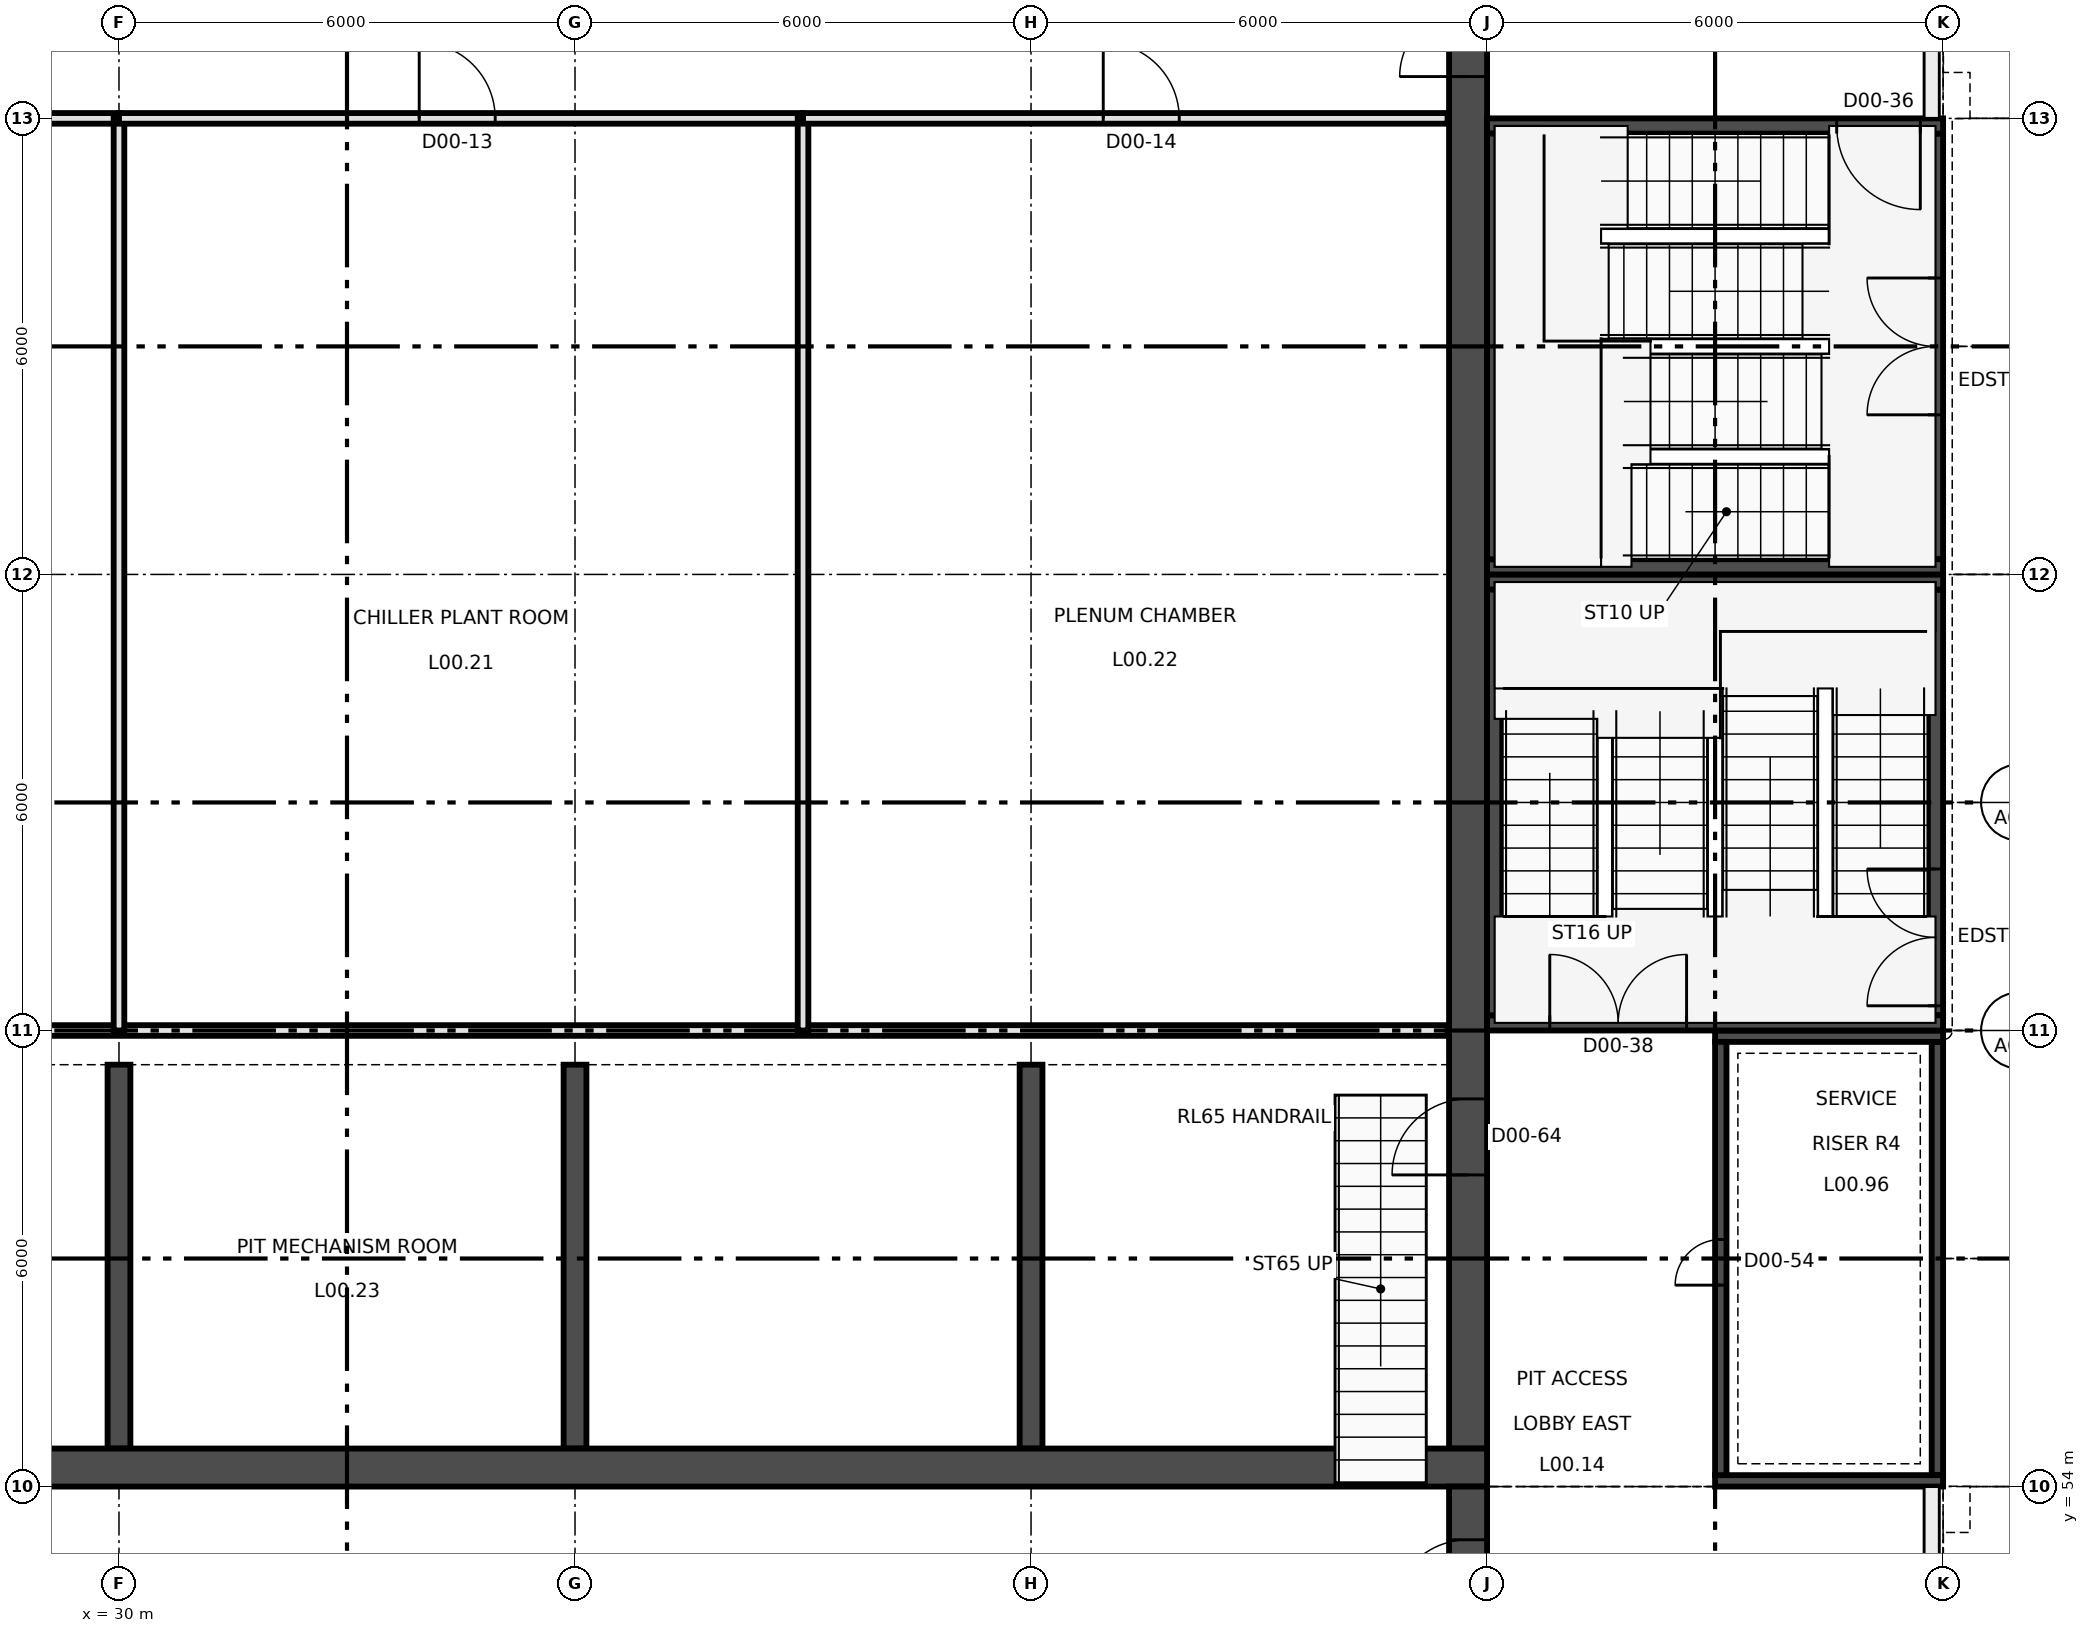
"""IFC4 building model, lengths in metres.
Left out: names, types, materials, properties, quantities, classifications, styles, units other than length and angle.
Written with IfcOpenShell. Run it as: python <this file> out.ifc"""

import sys

from ifc_helpers import new_model, si_unit, direction, frame, frame_2d, origin, place, context, subcontext, project, spatial, rectangle, extrude, element, fill, save


model = new_model("IFC4")
c1 = context("Model", 3, precision=1e-05, world=origin(), true_north=direction((0.0, 1.0)))
c2 = subcontext(c1, "Body", "Model", "MODEL_VIEW")
j1 = project(units=[si_unit("LENGTHUNIT", "METRE"), si_unit("PLANEANGLEUNIT", "RADIAN")], contexts=[c1])
p1 = place(None, origin())
s1 = spatial("IfcSite", under=j1, at=p1, CompositionType="ELEMENT")
p2 = place(p1, origin())
s2 = spatial("IfcBuilding", under=s1, at=p2, CompositionType="ELEMENT")
p3 = place(p2, origin())
s3 = spatial("IfcBuildingStorey", under=s2, at=p3, CompositionType="ELEMENT", Elevation=0.0)
p4 = place(p3, frame((48.0, 71.9, -0.3), z_axis=(0.0, 0.0, 1.0), x_axis=(1.0, 0.0, 0.0)))
e1 = element("IfcWall", 1, at=p4, inside=s3, PredefinedType="SHEAR", context=c2, shape_type="SweptSolid", body=[
    extrude(rectangle(XDim=6.0, YDim=0.2, at=frame_2d((3.0, 0.0))), origin(), (0.0, 0.0, 1.0), 7.3),
])
p5 = place(p4, frame((4.6, 0.0, 0.3)))
e2 = element("IfcOpeningElement", 2, at=p5, cuts=e1, PredefinedType="OPENING", context=c2, shape_type="SweptSolid", body=[
    extrude(rectangle(XDim=1.1, YDim=2.2, at=frame_2d((0.55, 1.1))), frame((0.0, 0.11, 0.0), z_axis=(0.0, -1.0, 0.0), x_axis=(1.0, 0.0, 0.0)), (0.0, 0.0, 1.0), 0.22),
])
p6 = place(p3, frame((48.0, 66.1, -0.3), z_axis=(0.0, 0.0, 1.0), x_axis=(1.0, 0.0, 0.0)))
e3 = element("IfcWall", 3, at=p6, inside=s3, PredefinedType="SHEAR", context=c2, shape_type="SweptSolid", body=[
    extrude(rectangle(XDim=6.0, YDim=0.2, at=frame_2d((3.0, 0.0))), origin(), (0.0, 0.0, 1.0), 7.3),
])
p7 = place(p3, frame((48.1, 66.2, -0.3), z_axis=(0.0, 0.0, 1.0), x_axis=(0.0, 1.0, 0.0)))
e4 = element("IfcWall", 4, at=p7, inside=s3, PredefinedType="SHEAR", context=c2, shape_type="SweptSolid", body=[
    extrude(rectangle(XDim=5.6, YDim=0.2, at=frame_2d((2.8, 0.0))), origin(), (0.0, 0.0, 1.0), 7.3),
])
p8 = place(p3, frame((53.9, 66.2, -0.3), z_axis=(0.0, 0.0, 1.0), x_axis=(0.0, 1.0, 0.0)))
e5 = element("IfcWall", 5, at=p8, inside=s3, PredefinedType="SHEAR", context=c2, shape_type="SweptSolid", body=[
    extrude(rectangle(XDim=5.6, YDim=0.2, at=frame_2d((2.8, 0.0))), origin(), (0.0, 0.0, 1.0), 7.3),
])
p9 = place(p8, frame((1.9, 0.0, 0.3)))
e6 = element("IfcOpeningElement", 6, at=p9, cuts=e5, PredefinedType="OPENING", context=c2, shape_type="SweptSolid", body=[
    extrude(rectangle(XDim=1.8, YDim=2.4, at=frame_2d((0.9, 1.2))), frame((0.0, 0.11, 0.0), z_axis=(0.0, -1.0, 0.0), x_axis=(1.0, 0.0, 0.0)), (0.0, 0.0, 1.0), 0.22),
])
p10 = place(p3, frame((48.0, 65.9, -0.3), z_axis=(0.0, 0.0, 1.0), x_axis=(1.0, 0.0, 0.0)))
e7 = element("IfcWall", 7, at=p10, inside=s3, PredefinedType="SHEAR", context=c2, shape_type="SweptSolid", body=[
    extrude(rectangle(XDim=6.0, YDim=0.2, at=frame_2d((3.0, 0.0))), origin(), (0.0, 0.0, 1.0), 7.3),
])
p11 = place(p3, frame((48.0, 60.1, -0.3), z_axis=(0.0, 0.0, 1.0), x_axis=(1.0, 0.0, 0.0)))
e8 = element("IfcWall", 8, at=p11, inside=s3, PredefinedType="SHEAR", context=c2, shape_type="SweptSolid", body=[
    extrude(rectangle(XDim=6.0, YDim=0.2, at=frame_2d((3.0, 0.0))), origin(), (0.0, 0.0, 1.0), 7.3),
])
p12 = place(p11, frame((0.825, 0.0, 0.3)))
e9 = element("IfcOpeningElement", 9, at=p12, cuts=e8, PredefinedType="OPENING", context=c2, shape_type="SweptSolid", body=[
    extrude(rectangle(XDim=1.8, YDim=2.2, at=frame_2d((0.9, 1.1))), frame((0.0, 0.11, 0.0), z_axis=(0.0, -1.0, 0.0), x_axis=(1.0, 0.0, 0.0)), (0.0, 0.0, 1.0), 0.22),
])
p13 = place(p3, frame((48.1, 60.2, -0.3), z_axis=(0.0, 0.0, 1.0), x_axis=(0.0, 1.0, 0.0)))
e10 = element("IfcWall", 10, at=p13, inside=s3, PredefinedType="SHEAR", context=c2, shape_type="SweptSolid", body=[
    extrude(rectangle(XDim=5.6, YDim=0.2, at=frame_2d((2.8, 0.0))), origin(), (0.0, 0.0, 1.0), 7.3),
])
p14 = place(p3, frame((53.9, 60.2, -0.3), z_axis=(0.0, 0.0, 1.0), x_axis=(0.0, 1.0, 0.0)))
e11 = element("IfcWall", 11, at=p14, inside=s3, PredefinedType="SHEAR", context=c2, shape_type="SweptSolid", body=[
    extrude(rectangle(XDim=5.6, YDim=0.2, at=frame_2d((2.8, 0.0))), origin(), (0.0, 0.0, 1.0), 7.3),
])
p15 = place(p14, frame((0.125, 0.0, 0.3)))
e12 = element("IfcOpeningElement", 12, at=p15, cuts=e11, PredefinedType="OPENING", context=c2, shape_type="SweptSolid", body=[
    extrude(rectangle(XDim=1.8, YDim=2.4, at=frame_2d((0.9, 1.2))), frame((0.0, 0.11, 0.0), z_axis=(0.0, -1.0, 0.0), x_axis=(1.0, 0.0, 0.0)), (0.0, 0.0, 1.0), 0.22),
])
for number, where, z_axis, x_axis in (
    (13, (51.0, 59.925, -0.3), (0.0, 0.0, 1.0), (1.0, 0.0, 0.0)),
    (14, (51.0, 54.075, -0.3), (0.0, 0.0, 1.0), (1.0, 0.0, 0.0)),
):
    element("IfcWall", number, at=place(p3, frame(where, z_axis=z_axis, x_axis=x_axis)), inside=s3, PredefinedType="SHEAR", context=c2, shape_type="SweptSolid", body=[
        extrude(rectangle(XDim=3.0, YDim=0.15, at=frame_2d((1.5, 0.0))), origin(), (0.0, 0.0, 1.0), 7.3),
    ])
p16 = place(p3, frame((51.075, 54.15, -0.3), z_axis=(0.0, 0.0, 1.0), x_axis=(0.0, 1.0, 0.0)))
e15 = element("IfcWall", 15, at=p16, inside=s3, PredefinedType="SHEAR", context=c2, shape_type="SweptSolid", body=[
    extrude(rectangle(XDim=5.7, YDim=0.15, at=frame_2d((2.85, 0.0))), origin(), (0.0, 0.0, 1.0), 7.3),
])
p17 = place(p16, frame((2.5, 0.0, 0.3)))
e16 = element("IfcOpeningElement", 16, at=p17, cuts=e15, PredefinedType="OPENING", context=c2, shape_type="SweptSolid", body=[
    extrude(rectangle(XDim=0.6, YDim=2.04, at=frame_2d((0.3, 1.02))), frame((0.0, 0.085, 0.0), z_axis=(0.0, -1.0, 0.0), x_axis=(1.0, 0.0, 0.0)), (0.0, 0.0, 1.0), 0.17),
])
p18 = place(p3, frame((53.925, 54.15, -0.3), z_axis=(0.0, 0.0, 1.0), x_axis=(0.0, 1.0, 0.0)))
e17 = element("IfcWall", 17, at=p18, inside=s3, PredefinedType="SHEAR", context=c2, shape_type="SweptSolid", body=[
    extrude(rectangle(XDim=5.7, YDim=0.15, at=frame_2d((2.85, 0.0))), origin(), (0.0, 0.0, 1.0), 7.3),
])
p19 = place(p3, frame((47.75, 54.5, -0.3), z_axis=(0.0, 0.0, 1.0), x_axis=(0.0, 1.0, 0.0)))
e18 = element("IfcWall", 18, at=p19, inside=s3, PredefinedType="SHEAR", context=c2, shape_type="SweptSolid", body=[
    extrude(rectangle(XDim=35.5, YDim=0.5, at=frame_2d((17.75, 0.0))), origin(), (0.0, 0.0, 1.0), 7.3),
])
p20 = place(p19, frame((18.05, 0.0, 0.3)))
e19 = element("IfcOpeningElement", 19, at=p20, cuts=e18, PredefinedType="OPENING", context=c2, shape_type="SweptSolid", body=[
    extrude(rectangle(XDim=1.8, YDim=2.1, at=frame_2d((0.9, 1.05))), frame((0.0, 0.26, 0.0), z_axis=(0.0, -1.0, 0.0), x_axis=(1.0, 0.0, 0.0)), (0.0, 0.0, 1.0), 0.52),
])
p21 = place(p19, frame((3.6, 0.0, 0.3)))
e20 = element("IfcOpeningElement", 20, at=p21, cuts=e18, PredefinedType="OPENING", context=c2, shape_type="SweptSolid", body=[
    extrude(rectangle(XDim=1.0, YDim=2.1, at=frame_2d((0.5, 1.05))), frame((0.0, 0.26, 0.0), z_axis=(0.0, -1.0, 0.0), x_axis=(1.0, 0.0, 0.0)), (0.0, 0.0, 1.0), 0.52),
])
p22 = place(p3, frame((47.75, 30.0, -0.3), z_axis=(0.0, 0.0, 1.0), x_axis=(0.0, 1.0, 0.0)))
e21 = element("IfcWall", 21, at=p22, inside=s3, PredefinedType="SHEAR", context=c2, shape_type="SweptSolid", body=[
    extrude(rectangle(XDim=24.0, YDim=0.5, at=frame_2d((12.0, 0.0))), origin(), (0.0, 0.0, 1.0), 7.3),
])
p23 = place(p22, frame((2.25, 0.0, 0.3)))
e22 = element("IfcOpeningElement", 22, at=p23, cuts=e21, PredefinedType="OPENING", context=c2, shape_type="SweptSolid", body=[
    extrude(rectangle(XDim=1.5, YDim=2.1, at=frame_2d((0.75, 1.05))), frame((0.0, 0.26, 0.0), z_axis=(0.0, -1.0, 0.0), x_axis=(1.0, 0.0, 0.0)), (0.0, 0.0, 1.0), 0.52),
])
p24 = place(p22, frame((22.3, 0.0, 0.3)))
e23 = element("IfcOpeningElement", 23, at=p24, cuts=e21, PredefinedType="OPENING", context=c2, shape_type="SweptSolid", body=[
    extrude(rectangle(XDim=1.0, YDim=2.1, at=frame_2d((0.5, 1.05))), frame((0.0, 0.26, 0.0), z_axis=(0.0, -1.0, 0.0), x_axis=(1.0, 0.0, 0.0)), (0.0, 0.0, 1.0), 0.52),
])
p25 = place(p3, frame((18.0, 54.25, -0.3), z_axis=(0.0, 0.0, 1.0), x_axis=(1.0, 0.0, 0.0)))
e24 = element("IfcWall", 24, at=p25, inside=s3, PredefinedType="SHEAR", context=c2, shape_type="SweptSolid", body=[
    extrude(rectangle(XDim=30.0, YDim=0.5, at=frame_2d((15.0, 0.0))), origin(), (0.0, 0.0, 1.0), 7.3),
])
for number, where, z_axis, x_axis in (
    (25, (30.0, 54.5, -0.3), (0.0, 0.0, 1.0), (0.0, 1.0, 0.0)),
    (26, (36.0, 54.5, -0.3), (0.0, 0.0, 1.0), (0.0, 1.0, 0.0)),
    (27, (42.0, 54.5, -0.3), (0.0, 0.0, 1.0), (0.0, 1.0, 0.0)),
):
    element("IfcWall", number, at=place(p3, frame(where, z_axis=z_axis, x_axis=x_axis)), inside=s3, PredefinedType="SHEAR", context=c2, shape_type="SweptSolid", body=[
        extrude(rectangle(XDim=5.05, YDim=0.3, at=frame_2d((2.525, 0.0))), origin(), (0.0, 0.0, 1.0), 4.0),
    ])
p26 = place(p3, frame((18.52, 60.0, 0.0), z_axis=(0.0, 0.0, 1.0), x_axis=(1.0, 0.0, 0.0)))
e28 = element("IfcWall", 28, at=p26, inside=s3, PredefinedType="PARTITIONING", context=c2, shape_type="SweptSolid", body=[
    extrude(rectangle(XDim=28.96, YDim=0.14, at=frame_2d((14.48, 0.0))), origin(), (0.0, 0.0, 1.0), 2.964),
])
p27 = place(p3, frame((18.52, 72.0, 0.0), z_axis=(0.0, 0.0, 1.0), x_axis=(1.0, 0.0, 0.0)))
e29 = element("IfcWall", 29, at=p27, inside=s3, PredefinedType="PARTITIONING", context=c2, shape_type="SweptSolid", body=[
    extrude(rectangle(XDim=11.48, YDim=0.14, at=frame_2d((5.74, 0.0))), origin(), (0.0, 0.0, 1.0), 3.924),
])
p28 = place(p27, frame((4.93, 0.0, 0.0)))
e30 = element("IfcOpeningElement", 30, at=p28, cuts=e29, PredefinedType="OPENING", context=c2, shape_type="SweptSolid", body=[
    extrude(rectangle(XDim=1.0, YDim=2.1, at=frame_2d((0.5, 1.05))), frame((0.0, 0.08, 0.0), z_axis=(0.0, -1.0, 0.0), x_axis=(1.0, 0.0, 0.0)), (0.0, 0.0, 1.0), 0.16),
])
p29 = place(p3, frame((30.0, 60.0, 0.0), z_axis=(0.0, 0.0, 1.0), x_axis=(0.0, 1.0, 0.0)))
e31 = element("IfcWall", 31, at=p29, inside=s3, PredefinedType="PARTITIONING", context=c2, shape_type="SweptSolid", body=[
    extrude(rectangle(XDim=12.0, YDim=0.14, at=frame_2d((6.0, 0.0))), origin(), (0.0, 0.0, 1.0), 2.964),
])
p30 = place(p3, frame((30.0, 72.0, 0.0), z_axis=(0.0, 0.0, 1.0), x_axis=(1.0, 0.0, 0.0)))
e32 = element("IfcWall", 32, at=p30, inside=s3, PredefinedType="PARTITIONING", context=c2, shape_type="SweptSolid", body=[
    extrude(rectangle(XDim=9.0, YDim=0.14, at=frame_2d((4.5, 0.0))), origin(), (0.0, 0.0, 1.0), 3.924),
])
p31 = place(p30, frame((3.95, 0.0, 0.0)))
e33 = element("IfcOpeningElement", 33, at=p31, cuts=e32, PredefinedType="OPENING", context=c2, shape_type="SweptSolid", body=[
    extrude(rectangle(XDim=1.0, YDim=2.1, at=frame_2d((0.5, 1.05))), frame((0.0, 0.08, 0.0), z_axis=(0.0, -1.0, 0.0), x_axis=(1.0, 0.0, 0.0)), (0.0, 0.0, 1.0), 0.16),
])
p32 = place(p3, frame((39.0, 60.0, 0.0), z_axis=(0.0, 0.0, 1.0), x_axis=(0.0, 1.0, 0.0)))
e34 = element("IfcWall", 34, at=p32, inside=s3, PredefinedType="PARTITIONING", context=c2, shape_type="SweptSolid", body=[
    extrude(rectangle(XDim=12.0, YDim=0.14, at=frame_2d((6.0, 0.0))), origin(), (0.0, 0.0, 1.0), 2.964),
])
p33 = place(p3, frame((39.0, 72.0, 0.0), z_axis=(0.0, 0.0, 1.0), x_axis=(1.0, 0.0, 0.0)))
e35 = element("IfcWall", 35, at=p33, inside=s3, PredefinedType="PARTITIONING", context=c2, shape_type="SweptSolid", body=[
    extrude(rectangle(XDim=8.48, YDim=0.14, at=frame_2d((4.24, 0.0))), origin(), (0.0, 0.0, 1.0), 3.924),
])
p34 = place(p33, frame((3.95, 0.0, 0.0)))
e36 = element("IfcOpeningElement", 36, at=p34, cuts=e35, PredefinedType="OPENING", context=c2, shape_type="SweptSolid", body=[
    extrude(rectangle(XDim=1.0, YDim=2.1, at=frame_2d((0.5, 1.05))), frame((0.0, 0.08, 0.0), z_axis=(0.0, -1.0, 0.0), x_axis=(1.0, 0.0, 0.0)), (0.0, 0.0, 1.0), 0.16),
])
p35 = place(p9, frame((1.8, 0.0, 0.0), z_axis=(0.0, 0.0, 1.0), x_axis=(-1.0, 0.0, 0.0)))
e37 = element("IfcDoor", 37, at=p35, inside=s3, OperationType="DOUBLE_DOOR_SINGLE_SWING", PredefinedType="DOOR", context=c2, shape_type="SweptSolid", body=[
    extrude(rectangle(XDim=1.8, YDim=2.4, at=frame_2d((0.9, 1.2))), frame((0.0, 0.025, 0.0), z_axis=(0.0, -1.0, 0.0), x_axis=(1.0, 0.0, 0.0)), (0.0, 0.0, 1.0), 0.05),
])
fill(e6, e37)
p36 = place(p15, frame((1.8, 0.0, 0.0), z_axis=(0.0, 0.0, 1.0), x_axis=(-1.0, 0.0, 0.0)))
e38 = element("IfcDoor", 38, at=p36, inside=s3, OperationType="DOUBLE_DOOR_SINGLE_SWING", PredefinedType="DOOR", context=c2, shape_type="SweptSolid", body=[
    extrude(rectangle(XDim=1.8, YDim=2.4, at=frame_2d((0.9, 1.2))), frame((0.0, 0.025, 0.0), z_axis=(0.0, -1.0, 0.0), x_axis=(1.0, 0.0, 0.0)), (0.0, 0.0, 1.0), 0.05),
])
fill(e12, e38)
p37 = place(p31, frame((1.0, 0.0, 0.0), z_axis=(0.0, 0.0, 1.0), x_axis=(-1.0, 0.0, 0.0)))
e39 = element("IfcDoor", 39, at=p37, inside=s3, OperationType="SINGLE_SWING_LEFT", PredefinedType="DOOR", context=c2, shape_type="SweptSolid", body=[
    extrude(rectangle(XDim=1.0, YDim=2.1, at=frame_2d((0.5, 1.05))), frame((0.0, 0.025, 0.0), z_axis=(0.0, -1.0, 0.0), x_axis=(1.0, 0.0, 0.0)), (0.0, 0.0, 1.0), 0.05),
])
fill(e33, e39)
p38 = place(p34, frame((1.0, 0.0, 0.0), z_axis=(0.0, 0.0, 1.0), x_axis=(-1.0, 0.0, 0.0)))
e40 = element("IfcDoor", 40, at=p38, inside=s3, OperationType="SINGLE_SWING_LEFT", PredefinedType="DOOR", context=c2, shape_type="SweptSolid", body=[
    extrude(rectangle(XDim=1.0, YDim=2.1, at=frame_2d((0.5, 1.05))), frame((0.0, 0.025, 0.0), z_axis=(0.0, -1.0, 0.0), x_axis=(1.0, 0.0, 0.0)), (0.0, 0.0, 1.0), 0.05),
])
fill(e36, e40)
p39 = place(p5, frame((1.1, 0.0, 0.0), z_axis=(0.0, 0.0, 1.0), x_axis=(-1.0, 0.0, 0.0)))
e41 = element("IfcDoor", 41, at=p39, inside=s3, OperationType="SINGLE_SWING_RIGHT", PredefinedType="DOOR", context=c2, shape_type="SweptSolid", body=[
    extrude(rectangle(XDim=1.1, YDim=2.2, at=frame_2d((0.55, 1.1))), frame((0.0, 0.025, 0.0), z_axis=(0.0, -1.0, 0.0), x_axis=(1.0, 0.0, 0.0)), (0.0, 0.0, 1.0), 0.05),
])
fill(e2, e41)
p40 = place(p12, origin())
e42 = element("IfcDoor", 42, at=p40, inside=s3, OperationType="DOUBLE_DOOR_SINGLE_SWING", PredefinedType="DOOR", context=c2, shape_type="SweptSolid", body=[
    extrude(rectangle(XDim=1.8, YDim=2.2, at=frame_2d((0.9, 1.1))), frame((0.0, 0.025, 0.0), z_axis=(0.0, -1.0, 0.0), x_axis=(1.0, 0.0, 0.0)), (0.0, 0.0, 1.0), 0.05),
])
fill(e9, e42)
p41 = place(p17, frame((0.6, 0.0, 0.0), z_axis=(0.0, 0.0, 1.0), x_axis=(-1.0, 0.0, 0.0)))
e43 = element("IfcDoor", 43, at=p41, inside=s3, OperationType="SINGLE_SWING_LEFT", PredefinedType="DOOR", context=c2, shape_type="SweptSolid", body=[
    extrude(rectangle(XDim=0.6, YDim=2.04, at=frame_2d((0.3, 1.02))), frame((0.0, 0.025, 0.0), z_axis=(0.0, -1.0, 0.0), x_axis=(1.0, 0.0, 0.0)), (0.0, 0.0, 1.0), 0.05),
])
fill(e16, e43)
p42 = place(p20, origin())
e44 = element("IfcDoor", 44, at=p42, inside=s3, OperationType="DOUBLE_DOOR_SINGLE_SWING", PredefinedType="DOOR", context=c2, shape_type="SweptSolid", body=[
    extrude(rectangle(XDim=1.8, YDim=2.1, at=frame_2d((0.9, 1.05))), frame((0.0, 0.025, 0.0), z_axis=(0.0, -1.0, 0.0), x_axis=(1.0, 0.0, 0.0)), (0.0, 0.0, 1.0), 0.05),
])
fill(e19, e44)
p43 = place(p21, frame((1.0, 0.0, 0.0), z_axis=(0.0, 0.0, 1.0), x_axis=(-1.0, 0.0, 0.0)))
e45 = element("IfcDoor", 45, at=p43, inside=s3, OperationType="SINGLE_SWING_LEFT", PredefinedType="DOOR", context=c2, shape_type="SweptSolid", body=[
    extrude(rectangle(XDim=1.0, YDim=2.1, at=frame_2d((0.5, 1.05))), frame((0.0, 0.025, 0.0), z_axis=(0.0, -1.0, 0.0), x_axis=(1.0, 0.0, 0.0)), (0.0, 0.0, 1.0), 0.05),
])
fill(e20, e45)
p44 = place(p24, frame((1.0, 0.0, 0.0), z_axis=(0.0, 0.0, 1.0), x_axis=(-1.0, 0.0, 0.0)))
e46 = element("IfcDoor", 46, at=p44, inside=s3, OperationType="SINGLE_SWING_LEFT", PredefinedType="DOOR", context=c2, shape_type="SweptSolid", body=[
    extrude(rectangle(XDim=1.0, YDim=2.1, at=frame_2d((0.5, 1.05))), frame((0.0, 0.025, 0.0), z_axis=(0.0, -1.0, 0.0), x_axis=(1.0, 0.0, 0.0)), (0.0, 0.0, 1.0), 0.05),
])
fill(e23, e46)
save(model, sys.argv[1])
